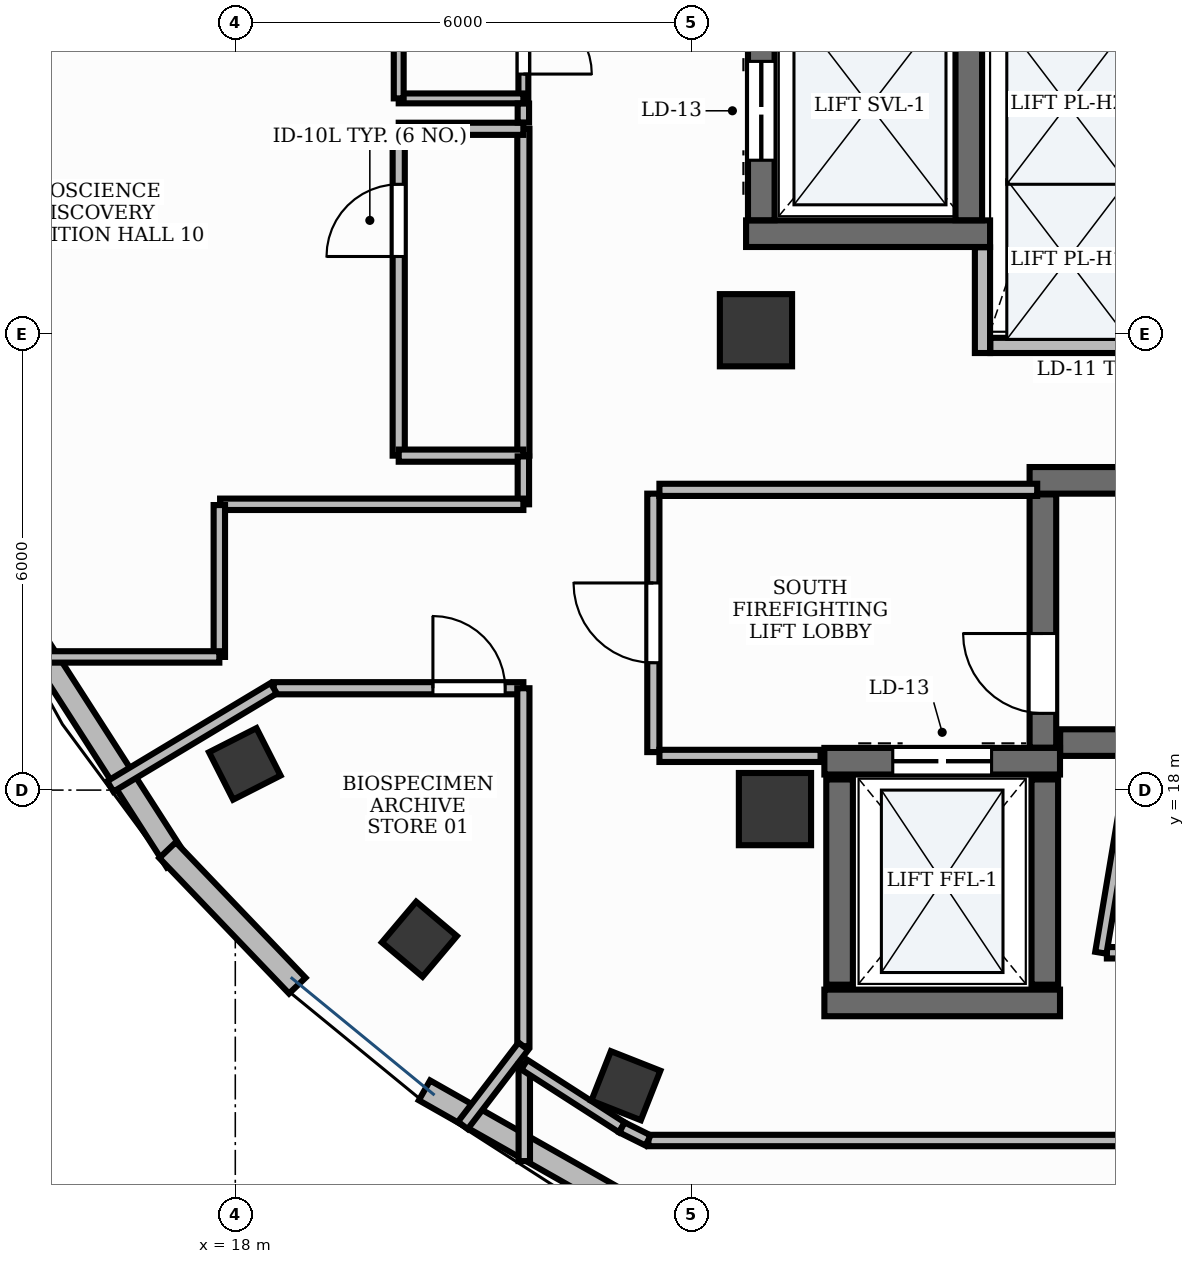
"""IFC4 building model, lengths in metres.
Left out: names, types, materials, properties, quantities, classifications, styles, units other than length and angle.
Written with IfcOpenShell. Run it as: python <this file> out.ifc"""

import sys

from ifc_helpers import new_model, si_unit, direction, frame, frame_2d, origin, origin_2d, place, context, subcontext, project, spatial, rectangle, extrude, element, fill, save


model = new_model("IFC4")
c1 = context("Model", 3, precision=1e-05, world=origin(), true_north=direction((0.0, 1.0)))
c2 = subcontext(c1, "Body", "Model", "MODEL_VIEW")
j1 = project(units=[si_unit("LENGTHUNIT", "METRE"), si_unit("PLANEANGLEUNIT", "RADIAN")], contexts=[c1])
p1 = place(None, origin())
s1 = spatial("IfcSite", under=j1, at=p1, CompositionType="ELEMENT")
p2 = place(p1, origin())
s2 = spatial("IfcBuilding", under=s1, at=p2, CompositionType="ELEMENT")
p3 = place(p2, frame((0.0, 0.0, 318.6)))
s3 = spatial("IfcBuildingStorey", under=s2, at=p3, CompositionType="ELEMENT", Elevation=318.6)
p4 = place(p3, frame((28.852, 18.625, 0.0), z_axis=(0.0, 0.0, 1.0), x_axis=(1.0, 0.0, 0.0)))
e1 = element("IfcWall", 1, at=p4, inside=s3, PredefinedType="SHEAR", context=c2, shape_type="SweptSolid", body=[
    extrude(rectangle(XDim=8.148, YDim=0.35, at=frame_2d((4.074, 0.0))), origin(), (0.0, 0.0, 1.0), 3.79),
])
p5 = place(p3, frame((28.45, 22.075, 0.0), z_axis=(0.0, 0.0, 1.0), x_axis=(1.0, 0.0, 0.0)))
e2 = element("IfcWall", 2, at=p5, inside=s3, PredefinedType="SHEAR", context=c2, shape_type="SweptSolid", body=[
    extrude(rectangle(XDim=8.55, YDim=0.35, at=frame_2d((4.275, 0.0))), origin(), (0.0, 0.0, 1.0), 3.79),
])
p6 = place(p3, frame((28.625, 18.557, 0.0), z_axis=(0.0, 0.0, 1.0), x_axis=(0.0, 1.0, 0.0)))
e3 = element("IfcWall", 3, at=p6, inside=s3, PredefinedType="SHEAR", context=c2, shape_type="SweptSolid", body=[
    extrude(rectangle(XDim=3.333, YDim=0.35, at=frame_2d((1.667, 0.0))), origin(), (0.0, 0.0, 1.0), 3.79),
])
p7 = place(p6, frame((0.453, 0.0, 0.0)))
e4 = element("IfcOpeningElement", 4, at=p7, cuts=e3, PredefinedType="OPENING", context=c2, shape_type="SweptSolid", body=[
    extrude(rectangle(XDim=1.05, YDim=2.15, at=frame_2d((0.525, 1.075))), frame((0.0, 0.19, 0.0), z_axis=(0.0, -1.0, 0.0), x_axis=(1.0, 0.0, 0.0)), (0.0, 0.0, 1.0), 0.38),
])
p8 = place(p3, frame((25.75, 15.2, 0.0), z_axis=(0.0, 0.0, 1.0), x_axis=(1.0, 0.0, 0.0)))
e5 = element("IfcWall", 5, at=p8, inside=s3, PredefinedType="SHEAR", context=c2, shape_type="SweptSolid", body=[
    extrude(rectangle(XDim=3.1, YDim=0.35, at=frame_2d((1.55, 0.0))), origin(), (0.0, 0.0, 1.0), 3.79),
])
p9 = place(p3, frame((25.75, 18.38, 0.0), z_axis=(0.0, 0.0, 1.0), x_axis=(1.0, 0.0, 0.0)))
e6 = element("IfcWall", 6, at=p9, inside=s3, PredefinedType="SHEAR", context=c2, shape_type="SweptSolid", body=[
    extrude(rectangle(XDim=3.1, YDim=0.35, at=frame_2d((1.55, 0.0))), origin(), (0.0, 0.0, 1.0), 3.79),
])
p10 = place(p9, frame((0.9, 0.0, 0.0)))
e7 = element("IfcOpeningElement", 7, at=p10, cuts=e6, PredefinedType="OPENING", context=c2, shape_type="SweptSolid", body=[
    extrude(rectangle(XDim=1.3, YDim=2.2, at=frame_2d((0.65, 1.1))), frame((0.0, 0.19, 0.0), z_axis=(0.0, -1.0, 0.0), x_axis=(1.0, 0.0, 0.0)), (0.0, 0.0, 1.0), 0.38),
])
for number, where, z_axis, x_axis in (
    (8, (25.95, 15.44, 0.0), (0.0, 0.0, 1.0), (0.0, 1.0, 0.0)),
    (9, (28.65, 15.44, 0.0), (0.0, 0.0, 1.0), (0.0, 1.0, 0.0)),
):
    element("IfcWall", number, at=place(p3, frame(where, z_axis=z_axis, x_axis=x_axis)), inside=s3, PredefinedType="SHEAR", context=c2, shape_type="SweptSolid", body=[
        extrude(rectangle(XDim=2.7, YDim=0.35, at=frame_2d((1.35, 0.0))), origin(), (0.0, 0.0, 1.0), 3.79),
    ])
p11 = place(p3, frame((24.72, 25.32, 0.0), z_axis=(0.0, 0.0, 1.0), x_axis=(1.0, 0.0, 0.0)))
e10 = element("IfcWall", 10, at=p11, inside=s3, PredefinedType="SHEAR", context=c2, shape_type="SweptSolid", body=[
    extrude(rectangle(XDim=3.21, YDim=0.35, at=frame_2d((1.605, 0.0))), origin(), (0.0, 0.0, 1.0), 3.79),
])
p12 = place(p3, frame((24.92, 25.497, 0.0), z_axis=(0.0, 0.0, 1.0), x_axis=(0.0, 1.0, 0.0)))
e11 = element("IfcWall", 11, at=p12, inside=s3, PredefinedType="SHEAR", context=c2, shape_type="SweptSolid", body=[
    extrude(rectangle(XDim=3.006, YDim=0.35, at=frame_2d((1.503, 0.0))), origin(), (0.0, 0.0, 1.0), 3.79),
])
p13 = place(p12, frame((0.79, 0.0, 0.0)))
e12 = element("IfcOpeningElement", 12, at=p13, cuts=e11, PredefinedType="OPENING", context=c2, shape_type="SweptSolid", body=[
    extrude(rectangle(XDim=1.3, YDim=2.2, at=frame_2d((0.65, 1.1))), frame((0.0, 0.19, 0.0), z_axis=(0.0, -1.0, 0.0), x_axis=(1.0, 0.0, 0.0)), (0.0, 0.0, 1.0), 0.38),
])
p14 = place(p3, frame((27.65, 25.497, 0.0), z_axis=(0.0, 0.0, 1.0), x_axis=(0.0, 1.0, 0.0)))
e13 = element("IfcWall", 13, at=p14, inside=s3, PredefinedType="SHEAR", context=c2, shape_type="SweptSolid", body=[
    extrude(rectangle(XDim=3.006, YDim=0.35, at=frame_2d((1.503, 0.0))), origin(), (0.0, 0.0, 1.0), 3.79),
])
for number, where, z_axis, x_axis in (
    (14, (24.85, 24.05, -0.0), (0.0, 0.0, 1.0), (1.0, 0.0, 0.0)),
    (15, (25.1, 17.75, -0.0), (0.0, 0.0, 1.0), (1.0, 0.0, 0.0)),
):
    element("IfcColumn", number, at=place(p3, frame(where, z_axis=z_axis, x_axis=x_axis)), inside=s3, PredefinedType="PILASTER", context=c2, shape_type="SweptSolid", body=[
        extrude(rectangle(XDim=0.95, YDim=0.95, at=origin_2d()), origin(), (0.0, 0.0, 1.0), 3.791),
    ])
for number, where, z_axis, x_axis in (
    (16, (18.125, 18.345, -0.0), (0.0, 0.0, 1.0), (-0.453, 0.891, 0.0)),
    (17, (20.422, 16.038, -0.0), (0.0, 0.0, 1.0), (-0.764, 0.645, 0.0)),
    (18, (23.138, 14.111, -0.0), (0.0, 0.0, 1.0), (-0.93, 0.367, 0.0)),
):
    element("IfcColumn", number, at=place(p3, frame(where, z_axis=z_axis, x_axis=x_axis)), inside=s3, PredefinedType="COLUMN", context=c2, shape_type="SweptSolid", body=[
        extrude(rectangle(XDim=0.7, YDim=0.7, at=origin_2d()), origin(), (0.0, 0.0, 1.0), 3.791),
    ])
p15 = place(p3, frame((14.738, 20.938, 0.0), z_axis=(0.0, 0.0, 1.0), x_axis=(0.540087262842, -0.841609023547, 0.0)))
e19 = element("IfcWall", 19, at=p15, inside=s3, PredefinedType="STANDARD", context=c2, shape_type="SweptSolid", body=[
    extrude(rectangle(XDim=4.603, YDim=0.3, at=frame_2d((2.302, 0.0))), origin(), (0.0, 0.0, 1.0), 3.79),
])
p16 = place(p3, frame((17.109, 17.21, 0.0), z_axis=(0.0, 0.0, 1.0), x_axis=(0.691456191778, -0.722418393213, 0.0)))
e20 = element("IfcWall", 20, at=p16, inside=s3, PredefinedType="STANDARD", context=c2, shape_type="SweptSolid", body=[
    extrude(rectangle(XDim=2.468, YDim=0.3, at=frame_2d((1.234, 0.0))), origin(), (0.0, 0.0, 1.0), 3.79),
])
p17 = place(p3, frame((20.489, 14.05, 0.0), z_axis=(0.0, 0.0, 1.0), x_axis=(0.869895003659, -0.493236943679, 0.0)))
e21 = element("IfcWall", 21, at=p17, inside=s3, PredefinedType="STANDARD", context=c2, shape_type="SweptSolid", body=[
    extrude(rectangle(XDim=5.051, YDim=0.3, at=frame_2d((2.526, 0.0))), origin(), (0.0, 0.0, 1.0), 3.79),
])
p18 = place(p3, frame((27.83, 23.75, 0.0), z_axis=(0.0, 0.0, 1.0), x_axis=(0.0, 1.0, 0.0)))
e22 = element("IfcWall", 22, at=p18, inside=s3, PredefinedType="PARTITIONING", context=c2, shape_type="SweptSolid", body=[
    extrude(rectangle(XDim=1.391, YDim=0.2, at=frame_2d((0.696, 0.0))), origin(), (0.0, 0.0, 1.0), 2.8),
])
p19 = place(p3, frame((27.934, 23.85, 0.0), z_axis=(0.0, 0.0, 1.0), x_axis=(1.0, 0.0, 0.0)))
e23 = element("IfcWall", 23, at=p19, inside=s3, PredefinedType="PARTITIONING", context=c2, shape_type="SweptSolid", body=[
    extrude(rectangle(XDim=2.096, YDim=0.2, at=frame_2d((1.048, 0.0))), origin(), (0.0, 0.0, 1.0), 2.8),
])
p20 = place(p3, frame((23.5, 18.5, 0.0), z_axis=(0.0, 0.0, 1.0), x_axis=(0.0, 1.0, 0.0)))
e24 = element("IfcWall", 24, at=p20, inside=s3, PredefinedType="PARTITIONING", context=c2, shape_type="SweptSolid", body=[
    extrude(rectangle(XDim=3.4, YDim=0.16, at=frame_2d((1.7, 0.0))), origin(), (0.0, 0.0, 1.0), 2.8),
])
p21 = place(p20, frame((1.175, 0.0, 0.0)))
e25 = element("IfcOpeningElement", 25, at=p21, cuts=e24, PredefinedType="OPENING", context=c2, shape_type="SweptSolid", body=[
    extrude(rectangle(XDim=1.05, YDim=2.15, at=frame_2d((0.525, 1.075))), frame((0.0, 0.095, 0.0), z_axis=(0.0, -1.0, 0.0), x_axis=(1.0, 0.0, 0.0)), (0.0, 0.0, 1.0), 0.19),
])
p22 = place(p3, frame((23.58, 21.95, 0.0), z_axis=(0.0, 0.0, 1.0), x_axis=(1.0, 0.0, 0.0)))
e26 = element("IfcWall", 26, at=p22, inside=s3, PredefinedType="PARTITIONING", context=c2, shape_type="SweptSolid", body=[
    extrude(rectangle(XDim=4.97, YDim=0.16, at=frame_2d((2.485, 0.0))), origin(), (0.0, 0.0, 1.0), 2.8),
])
p23 = place(p3, frame((23.58, 18.45, 0.0), z_axis=(0.0, 0.0, 1.0), x_axis=(1.0, 0.0, 0.0)))
e27 = element("IfcWall", 27, at=p23, inside=s3, PredefinedType="PARTITIONING", context=c2, shape_type="SweptSolid", body=[
    extrude(rectangle(XDim=2.12, YDim=0.16, at=frame_2d((1.06, 0.0))), origin(), (0.0, 0.0, 1.0), 2.8),
])
p24 = place(p3, frame((20.15, 22.4, 0.0), z_axis=(0.0, 0.0, 1.0), x_axis=(0.0, 1.0, 0.0)))
e28 = element("IfcWall", 28, at=p24, inside=s3, PredefinedType="PARTITIONING", context=c2, shape_type="SweptSolid", body=[
    extrude(rectangle(XDim=4.3, YDim=0.16, at=frame_2d((2.15, 0.0))), origin(), (0.0, 0.0, 1.0), 2.8),
])
p25 = place(p24, frame((2.62, 0.0, 0.0)))
e29 = element("IfcOpeningElement", 29, at=p25, cuts=e28, PredefinedType="OPENING", context=c2, shape_type="SweptSolid", body=[
    extrude(rectangle(XDim=0.95, YDim=2.15, at=frame_2d((0.475, 1.075))), frame((0.0, 0.095, 0.0), z_axis=(0.0, -1.0, 0.0), x_axis=(1.0, 0.0, 0.0)), (0.0, 0.0, 1.0), 0.19),
])
p26 = place(p3, frame((21.79, 31.4, 0.0), z_axis=(0.0, 0.0, 1.0), x_axis=(0.0, -1.0, 0.0)))
e30 = element("IfcWall", 30, at=p26, inside=s3, PredefinedType="PARTITIONING", context=c2, shape_type="SweptSolid", body=[
    extrude(rectangle(XDim=4.3, YDim=0.13, at=frame_2d((2.15, 0.0))), origin(), (0.0, 0.0, 1.0), 2.8),
])
p27 = place(p26, frame((3.08, 0.0, 0.0)))
e31 = element("IfcOpeningElement", 31, at=p27, cuts=e30, PredefinedType="OPENING", context=c2, shape_type="SweptSolid", body=[
    extrude(rectangle(XDim=0.9, YDim=2.15, at=frame_2d((0.45, 1.075))), frame((0.0, 0.08, 0.0), z_axis=(0.0, -1.0, 0.0), x_axis=(1.0, 0.0, 0.0)), (0.0, 0.0, 1.0), 0.16),
])
p28 = place(p3, frame((18.505, 19.34, 0.0), z_axis=(0.0, 0.0, 1.0), x_axis=(1.0, 0.0, 0.0)))
e32 = element("IfcWall", 32, at=p28, inside=s3, PredefinedType="PARTITIONING", context=c2, shape_type="SweptSolid", body=[
    extrude(rectangle(XDim=3.285, YDim=0.16, at=frame_2d((1.643, 0.0))), origin(), (0.0, 0.0, 1.0), 2.8),
])
p29 = place(p28, frame((2.095, 0.0, 0.0)))
e33 = element("IfcOpeningElement", 33, at=p29, cuts=e32, PredefinedType="OPENING", context=c2, shape_type="SweptSolid", body=[
    extrude(rectangle(XDim=0.95, YDim=2.15, at=frame_2d((0.475, 1.075))), frame((0.0, 0.095, 0.0), z_axis=(0.0, -1.0, 0.0), x_axis=(1.0, 0.0, 0.0)), (0.0, 0.0, 1.0), 0.19),
])
p30 = place(p3, frame((23.435, 13.39, 0.0), z_axis=(0.0, 0.0, 1.0), x_axis=(1.0, 0.0, 0.0)))
e34 = element("IfcWall", 34, at=p30, inside=s3, PredefinedType="PARTITIONING", context=c2, shape_type="SweptSolid", body=[
    extrude(rectangle(XDim=15.965, YDim=0.15, at=frame_2d((7.982, 0.0))), origin(), (0.0, 0.0, 1.0), 2.8),
])
p31 = place(p30, frame((7.478, 0.0, 0.0)))
e35 = element("IfcOpeningElement", 35, at=p31, cuts=e34, PredefinedType="OPENING", context=c2, shape_type="SweptSolid", body=[
    extrude(rectangle(XDim=0.95, YDim=2.15, at=frame_2d((0.475, 1.075))), frame((0.0, 0.09, 0.0), z_axis=(0.0, -1.0, 0.0), x_axis=(1.0, 0.0, 0.0)), (0.0, 0.0, 1.0), 0.18),
])
p32 = place(p3, frame((21.79, 26.7, 0.0), z_axis=(0.0, 0.0, 1.0), x_axis=(0.0, -1.0, 0.0)))
e36 = element("IfcWall", 36, at=p32, inside=s3, PredefinedType="PARTITIONING", context=c2, shape_type="SweptSolid", body=[
    extrude(rectangle(XDim=4.3, YDim=0.16, at=frame_2d((2.15, 0.0))), origin(), (0.0, 0.0, 1.0), 2.8),
])
for number, where, z_axis, x_axis in (
    (37, (21.79, 22.4, 0.0), (0.0, 0.0, 1.0), (-1.0, 0.0, 0.0)),
    (38, (20.15, 26.7, 0.0), (0.0, 0.0, 1.0), (1.0, 0.0, 0.0)),
):
    element("IfcWall", number, at=place(p3, frame(where, z_axis=z_axis, x_axis=x_axis)), inside=s3, PredefinedType="PARTITIONING", context=c2, shape_type="SweptSolid", body=[
        extrude(rectangle(XDim=1.64, YDim=0.16, at=frame_2d((0.82, 0.0))), origin(), (0.0, 0.0, 1.0), 2.8),
    ])
p33 = place(p3, frame((21.79, 27.1, 0.0), z_axis=(0.0, 0.0, 1.0), x_axis=(-1.0, 0.0, 0.0)))
e39 = element("IfcWall", 39, at=p33, inside=s3, PredefinedType="PARTITIONING", context=c2, shape_type="SweptSolid", body=[
    extrude(rectangle(XDim=1.64, YDim=0.13, at=frame_2d((0.82, 0.0))), origin(), (0.0, 0.0, 1.0), 2.8),
])
p34 = place(p3, frame((20.15, 27.1, 0.0), z_axis=(0.0, 0.0, 1.0), x_axis=(0.0, 1.0, 0.0)))
e40 = element("IfcWall", 40, at=p34, inside=s3, PredefinedType="PARTITIONING", context=c2, shape_type="SweptSolid", body=[
    extrude(rectangle(XDim=4.3, YDim=0.13, at=frame_2d((2.15, 0.0))), origin(), (0.0, 0.0, 1.0), 2.8),
])
p35 = place(p3, frame((16.356, 18.049, 0.0), z_axis=(0.0, 0.0, 1.0), x_axis=(0.857166307375, 0.51503972808, 0.0)))
e41 = element("IfcWall", 41, at=p35, inside=s3, PredefinedType="PARTITIONING", context=c2, shape_type="SweptSolid", body=[
    extrude(rectangle(XDim=2.508, YDim=0.16, at=frame_2d((1.254, 0.0))), origin(), (0.0, 0.0, 1.0), 2.8),
])
p36 = place(p3, frame((21.79, 19.34, 0.0), z_axis=(0.0, 0.0, 1.0), x_axis=(0.0, -1.0, 0.0)))
e42 = element("IfcWall", 42, at=p36, inside=s3, PredefinedType="PARTITIONING", context=c2, shape_type="SweptSolid", body=[
    extrude(rectangle(XDim=4.709, YDim=0.16, at=frame_2d((2.355, 0.0))), origin(), (0.0, 0.0, 1.0), 2.8),
])
p37 = place(p3, frame((21.79, 14.631, 0.0), z_axis=(0.0, 0.0, 1.0), x_axis=(-0.607422460056, -0.794378974432, 0.0)))
e43 = element("IfcWall", 43, at=p37, inside=s3, PredefinedType="PARTITIONING", context=c2, shape_type="SweptSolid", body=[
    extrude(rectangle(XDim=1.311, YDim=0.16, at=frame_2d((0.656, 0.0))), origin(), (0.0, 0.0, 1.0), 2.8),
])
p38 = place(p3, frame((29.8, 15.86, 0.0), z_axis=(0.0, 0.0, 1.0), x_axis=(-1.0, 0.0, 0.0)))
e44 = element("IfcWall", 44, at=p38, inside=s3, PredefinedType="PARTITIONING", context=c2, shape_type="SweptSolid", body=[
    extrude(rectangle(XDim=0.333, YDim=0.15, at=frame_2d((0.167, 0.0))), origin(), (0.0, 0.0, 1.0), 2.8),
])
p39 = place(p3, frame((29.387, 15.86, 0.0), z_axis=(0.0, 0.0, 1.0), x_axis=(0.165099347881, 0.986276941497, 0.0)))
e45 = element("IfcWall", 45, at=p39, inside=s3, PredefinedType="PARTITIONING", context=c2, shape_type="SweptSolid", body=[
    extrude(rectangle(XDim=2.261, YDim=0.15, at=frame_2d((1.13, 0.0))), origin(), (0.0, 0.0, 1.0), 2.8),
])
p40 = place(p3, frame((21.802, 13.119, 0.0), z_axis=(0.0, 0.0, 1.0), x_axis=(0.0, 1.0, 0.0)))
e46 = element("IfcWall", 46, at=p40, inside=s3, PredefinedType="PARTITIONING", context=c2, shape_type="SweptSolid", body=[
    extrude(rectangle(XDim=1.269, YDim=0.15, at=frame_2d((0.634, 0.0))), origin(), (0.0, 0.0, 1.0), 2.8),
])
p41 = place(p3, frame((21.802, 14.388, 0.0), z_axis=(0.0, 0.0, 1.0), x_axis=(0.841116099264, -0.540854608522, 0.0)))
e47 = element("IfcWall", 47, at=p41, inside=s3, PredefinedType="PARTITIONING", context=c2, shape_type="SweptSolid", body=[
    extrude(rectangle(XDim=1.526, YDim=0.15, at=frame_2d((0.763, 0.0))), origin(), (0.0, 0.0, 1.0), 2.8),
])
p42 = place(p3, frame((23.087, 13.562, 0.0), z_axis=(0.0, 0.0, 1.0), x_axis=(0.895442423971, -0.445177341463, 0.0)))
e48 = element("IfcWall", 48, at=p42, inside=s3, PredefinedType="PARTITIONING", context=c2, shape_type="SweptSolid", body=[
    extrude(rectangle(XDim=0.384, YDim=0.15, at=frame_2d((0.192, 0.0))), origin(), (0.0, 0.0, 1.0), 2.8),
])
p43 = place(p3, frame((21.79, 27.032, 0.0), z_axis=(0.0, 0.0, 1.0), x_axis=(0.0, -1.0, 0.0)))
e49 = element("IfcWall", 49, at=p43, inside=s3, PredefinedType="PARTITIONING", context=c2, shape_type="SweptSolid", body=[
    extrude(rectangle(XDim=0.249, YDim=0.15, at=frame_2d((0.125, 0.0))), origin(), (0.0, 0.0, 1.0), 2.8),
])
p44 = place(p3, frame((21.79, 22.39, 0.0), z_axis=(0.0, 0.0, 1.0), x_axis=(0.0, -1.0, 0.0)))
e50 = element("IfcWall", 50, at=p44, inside=s3, PredefinedType="PARTITIONING", context=c2, shape_type="SweptSolid", body=[
    extrude(rectangle(XDim=0.63, YDim=0.15, at=frame_2d((0.315, 0.0))), origin(), (0.0, 0.0, 1.0), 2.8),
])
p45 = place(p3, frame((21.79, 21.76, 0.0), z_axis=(0.0, 0.0, 1.0), x_axis=(-1.0, 0.0, 0.0)))
e51 = element("IfcWall", 51, at=p45, inside=s3, PredefinedType="PARTITIONING", context=c2, shape_type="SweptSolid", body=[
    extrude(rectangle(XDim=3.99, YDim=0.15, at=frame_2d((1.995, 0.0))), origin(), (0.0, 0.0, 1.0), 2.8),
])
p46 = place(p3, frame((17.79, 21.75, 0.0), z_axis=(0.0, 0.0, 1.0), x_axis=(0.0, -1.0, 0.0)))
e52 = element("IfcWall", 52, at=p46, inside=s3, PredefinedType="PARTITIONING", context=c2, shape_type="SweptSolid", body=[
    extrude(rectangle(XDim=1.998, YDim=0.15, at=frame_2d((0.999, 0.0))), origin(), (0.0, 0.0, 1.0), 2.8),
])
p47 = place(p3, frame((17.79, 19.752, 0.0), z_axis=(0.0, 0.0, 1.0), x_axis=(-1.0, 0.0, 0.0)))
e53 = element("IfcWall", 53, at=p47, inside=s3, PredefinedType="PARTITIONING", context=c2, shape_type="SweptSolid", body=[
    extrude(rectangle(XDim=2.491, YDim=0.15, at=frame_2d((1.246, 0.0))), origin(), (0.0, 0.0, 1.0), 2.8),
])
p48 = place(p7, origin())
e54 = element("IfcDoor", 54, at=p48, inside=s3, OperationType="SINGLE_SWING_RIGHT", PredefinedType="DOOR", context=c2, shape_type="SweptSolid", body=[
    extrude(rectangle(XDim=1.05, YDim=2.15, at=frame_2d((0.525, 1.075))), frame((0.0, 0.025, 0.0), z_axis=(0.0, -1.0, 0.0), x_axis=(1.0, 0.0, 0.0)), (0.0, 0.0, 1.0), 0.05),
])
fill(e4, e54)
p49 = place(p10, origin())
e55 = element("IfcDoor", 55, at=p49, inside=s3, OperationType="DOUBLE_DOOR_SLIDING", PredefinedType="DOOR", context=c2, shape_type="SweptSolid", body=[
    extrude(rectangle(XDim=1.3, YDim=2.2, at=frame_2d((0.65, 1.1))), frame((0.0, 0.025, 0.0), z_axis=(0.0, -1.0, 0.0), x_axis=(1.0, 0.0, 0.0)), (0.0, 0.0, 1.0), 0.05),
])
fill(e7, e55)
p50 = place(p13, origin())
e56 = element("IfcDoor", 56, at=p50, inside=s3, OperationType="DOUBLE_DOOR_SLIDING", PredefinedType="DOOR", context=c2, shape_type="SweptSolid", body=[
    extrude(rectangle(XDim=1.3, YDim=2.2, at=frame_2d((0.65, 1.1))), frame((0.0, 0.025, 0.0), z_axis=(0.0, -1.0, 0.0), x_axis=(1.0, 0.0, 0.0)), (0.0, 0.0, 1.0), 0.05),
])
fill(e12, e56)
p51 = place(p21, origin())
e57 = element("IfcDoor", 57, at=p51, inside=s3, OperationType="SINGLE_SWING_RIGHT", PredefinedType="DOOR", context=c2, shape_type="SweptSolid", body=[
    extrude(rectangle(XDim=1.05, YDim=2.15, at=frame_2d((0.525, 1.075))), frame((0.0, 0.025, 0.0), z_axis=(0.0, -1.0, 0.0), x_axis=(1.0, 0.0, 0.0)), (0.0, 0.0, 1.0), 0.05),
])
fill(e25, e57)
p52 = place(p25, origin())
e58 = element("IfcDoor", 58, at=p52, inside=s3, OperationType="SINGLE_SWING_LEFT", PredefinedType="DOOR", context=c2, shape_type="SweptSolid", body=[
    extrude(rectangle(XDim=0.95, YDim=2.15, at=frame_2d((0.475, 1.075))), frame((0.0, 0.025, 0.0), z_axis=(0.0, -1.0, 0.0), x_axis=(1.0, 0.0, 0.0)), (0.0, 0.0, 1.0), 0.05),
])
fill(e29, e58)
p53 = place(p27, origin())
e59 = element("IfcDoor", 59, at=p53, inside=s3, OperationType="SINGLE_SWING_RIGHT", PredefinedType="DOOR", context=c2, shape_type="SweptSolid", body=[
    extrude(rectangle(XDim=0.9, YDim=2.15, at=frame_2d((0.45, 1.075))), frame((0.0, 0.025, 0.0), z_axis=(0.0, -1.0, 0.0), x_axis=(1.0, 0.0, 0.0)), (0.0, 0.0, 1.0), 0.05),
])
fill(e31, e59)
p54 = place(p29, origin())
e60 = element("IfcDoor", 60, at=p54, inside=s3, OperationType="SINGLE_SWING_LEFT", PredefinedType="DOOR", context=c2, shape_type="SweptSolid", body=[
    extrude(rectangle(XDim=0.95, YDim=2.15, at=frame_2d((0.475, 1.075))), frame((0.0, 0.025, 0.0), z_axis=(0.0, -1.0, 0.0), x_axis=(1.0, 0.0, 0.0)), (0.0, 0.0, 1.0), 0.05),
])
fill(e33, e60)
save(model, sys.argv[1])
